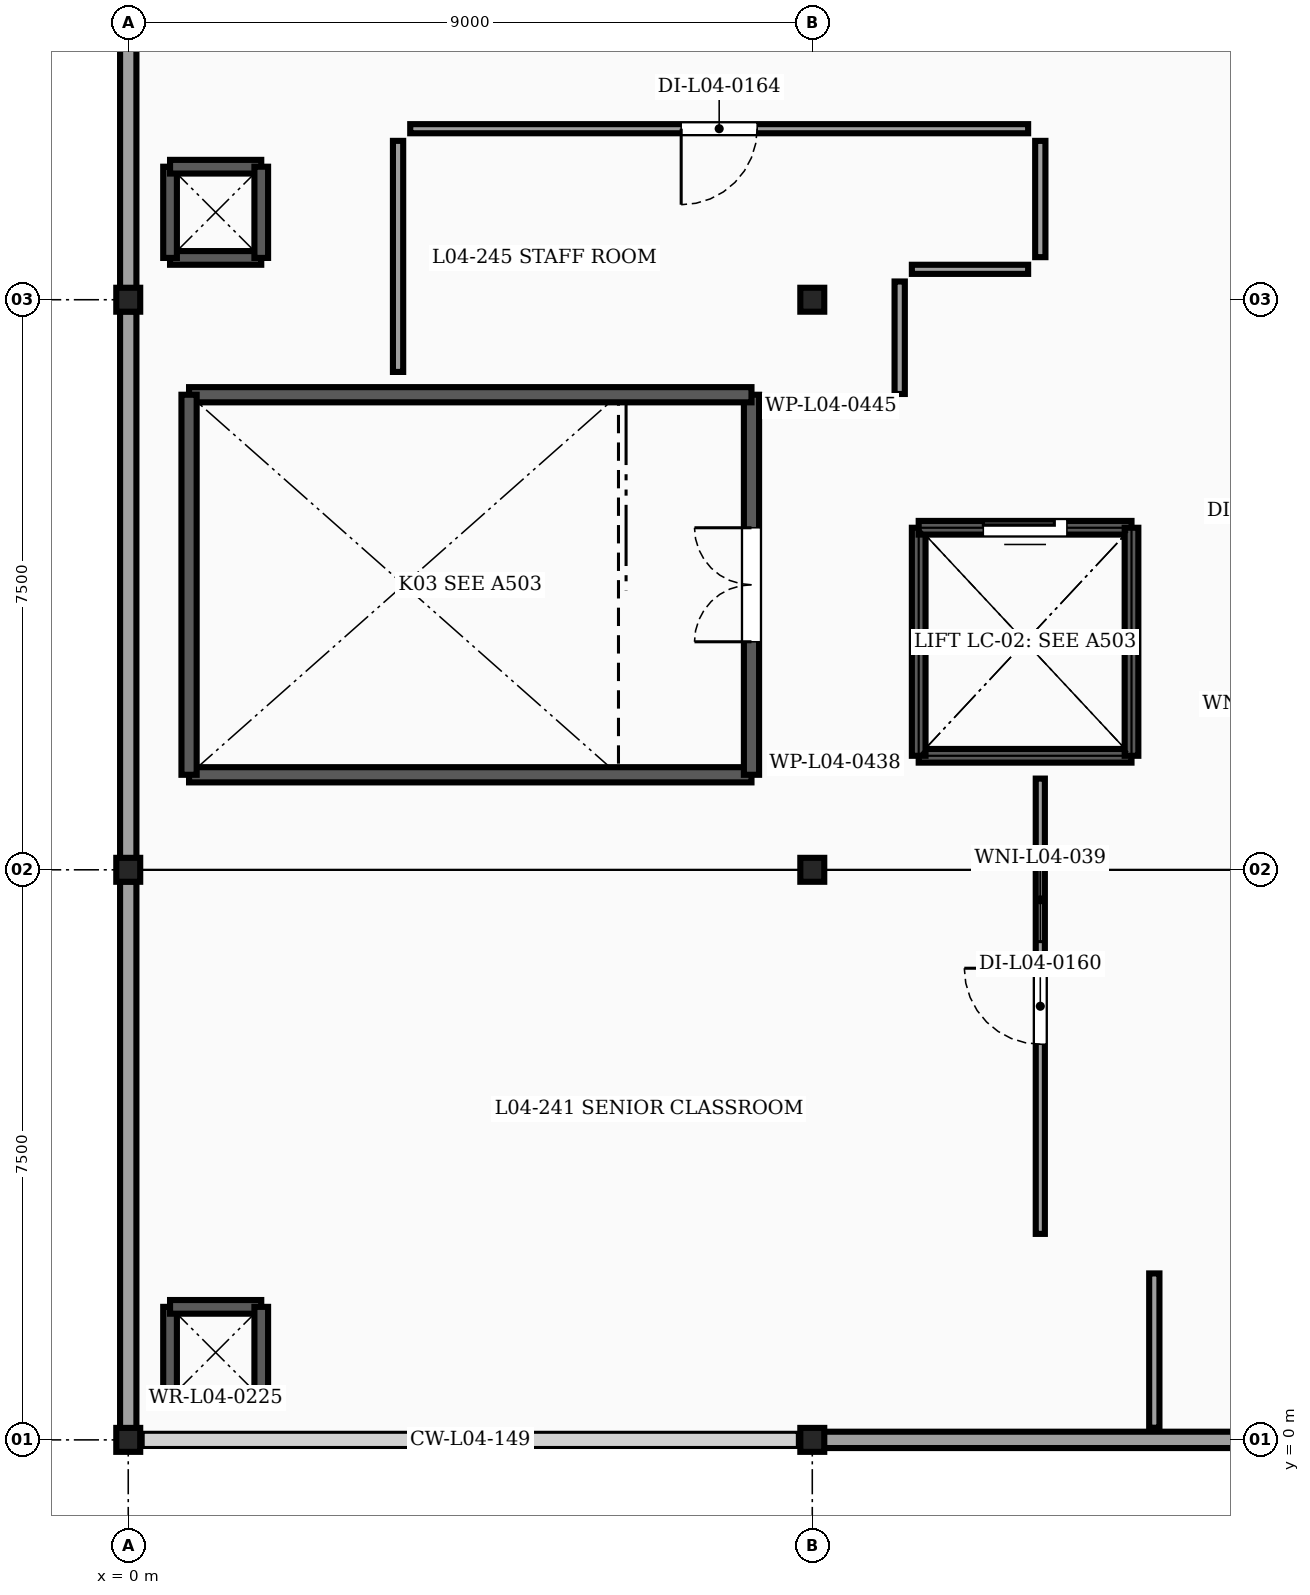
"""IFC4 building model, lengths in metres.
Left out: names, types, materials, properties, quantities, classifications, styles, units other than length and angle.
Written with IfcOpenShell. Run it as: python <this file> out.ifc"""

import sys

from ifc_helpers import new_model, si_unit, direction, frame, frame_2d, origin, origin_2d, place, context, subcontext, project, spatial, rectangle, extrude, element, fill, save


model = new_model("IFC4")
c1 = context("Model", 3, precision=1e-05, world=origin(), true_north=direction((0.0, 1.0)))
c2 = subcontext(c1, "Body", "Model", "MODEL_VIEW")
j1 = project(units=[si_unit("LENGTHUNIT", "METRE"), si_unit("PLANEANGLEUNIT", "RADIAN")], contexts=[c1])
p1 = place(None, origin())
s1 = spatial("IfcSite", under=j1, at=p1, CompositionType="ELEMENT")
p2 = place(p1, origin())
s2 = spatial("IfcBuilding", under=s1, at=p2, CompositionType="ELEMENT")
p3 = place(p2, frame((0.0, 0.0, 16.1)))
s3 = spatial("IfcBuildingStorey", under=s2, at=p3, CompositionType="ELEMENT", Elevation=16.1)
for number, where, z_axis, x_axis in (
    (1, (0.0, 0.0, 0.0), (0.0, 0.0, 1.0), (1.0, 0.0, 0.0)),
    (2, (9.0, 0.0, 0.0), (0.0, 0.0, 1.0), (1.0, 0.0, 0.0)),
    (3, (0.0, 7.5, 0.0), (0.0, 0.0, 1.0), (1.0, 0.0, 0.0)),
    (4, (9.0, 7.5, 0.0), (0.0, 0.0, 1.0), (1.0, 0.0, 0.0)),
    (5, (0.0, 15.0, 0.0), (0.0, 0.0, 1.0), (1.0, 0.0, 0.0)),
    (6, (9.0, 15.0, 0.0), (0.0, 0.0, 1.0), (1.0, 0.0, 0.0)),
):
    element("IfcColumn", number, at=place(p3, frame(where, z_axis=z_axis, x_axis=x_axis)), inside=s3, PredefinedType="COLUMN", context=c2, shape_type="SweptSolid", body=[
        extrude(rectangle(XDim=0.315, YDim=0.315, at=origin_2d()), origin(), (0.0, 0.0, 1.0), 3.65),
    ])
p4 = place(p3, frame((17.846, 0.0, 0.0), z_axis=(0.0, 0.0, 1.0), x_axis=(-1.0, 0.0, 0.0)))
e7 = element("IfcWall", 7, at=p4, inside=s3, PredefinedType="SOLIDWALL", context=c2, shape_type="SweptSolid", body=[
    extrude(rectangle(XDim=8.693, YDim=0.215, at=frame_2d((4.346, 0.0))), origin(), (0.0, 0.0, 1.0), 3.057),
])
for number, where, z_axis, x_axis in (
    (8, (0.0, 0.154, 0.0), (0.0, 0.0, 1.0), (0.0, 1.0, 0.0)),
    (9, (0.0, 7.654, 0.0), (0.0, 0.0, 1.0), (0.0, 1.0, 0.0)),
    (10, (0.0, 15.154, 0.0), (0.0, 0.0, 1.0), (0.0, 1.0, 0.0)),
):
    element("IfcWall", number, at=place(p3, frame(where, z_axis=z_axis, x_axis=x_axis)), inside=s3, PredefinedType="SOLIDWALL", context=c2, shape_type="SweptSolid", body=[
        extrude(rectangle(XDim=7.193, YDim=0.215, at=frame_2d((3.596, 0.0))), origin(), (0.0, 0.0, 1.0), 3.057),
    ])
for number, where, z_axis, x_axis in (
    (11, (1.75, 0.55, 0.0), (0.0, 0.0, 1.0), (-1.0, 0.0, 0.0)),
    (12, (0.55, 0.55, 0.0), (0.0, 0.0, 1.0), (0.0, 1.0, 0.0)),
    (13, (0.55, 1.75, 0.0), (0.0, 0.0, 1.0), (1.0, 0.0, 0.0)),
    (14, (1.75, 1.75, 0.0), (0.0, 0.0, 1.0), (0.0, -1.0, 0.0)),
    (15, (1.75, 15.55, 0.0), (0.0, 0.0, 1.0), (-1.0, 0.0, 0.0)),
    (16, (0.55, 15.55, 0.0), (0.0, 0.0, 1.0), (0.0, 1.0, 0.0)),
    (17, (0.55, 16.75, 0.0), (0.0, 0.0, 1.0), (1.0, 0.0, 0.0)),
    (18, (1.75, 16.75, 0.0), (0.0, 0.0, 1.0), (0.0, -1.0, 0.0)),
):
    element("IfcWall", number, at=place(p3, frame(where, z_axis=z_axis, x_axis=x_axis)), inside=s3, PredefinedType="SHEAR", context=c2, shape_type="SweptSolid", body=[
        extrude(rectangle(XDim=1.2, YDim=0.18, at=frame_2d((0.6, 0.0))), origin(), (0.0, 0.0, 1.0), 3.65),
    ])
p5 = place(p3, frame((0.8, 8.75, 0.0), z_axis=(0.0, 0.0, 1.0), x_axis=(1.0, 0.0, 0.0)))
e19 = element("IfcWall", 19, at=p5, inside=s3, PredefinedType="SHEAR", context=c2, shape_type="SweptSolid", body=[
    extrude(rectangle(XDim=7.4, YDim=0.2, at=frame_2d((3.7, 0.0))), origin(), (0.0, 0.0, 1.0), 3.65),
])
p6 = place(p3, frame((8.2, 8.75, 0.0), z_axis=(0.0, 0.0, 1.0), x_axis=(0.0, 1.0, 0.0)))
e20 = element("IfcWall", 20, at=p6, inside=s3, PredefinedType="SHEAR", context=c2, shape_type="SweptSolid", body=[
    extrude(rectangle(XDim=5.0, YDim=0.2, at=frame_2d((2.5, 0.0))), origin(), (0.0, 0.0, 1.0), 3.65),
])
p7 = place(p6, frame((1.75, 0.0, 0.0)))
e21 = element("IfcOpeningElement", 21, at=p7, cuts=e20, PredefinedType="OPENING", context=c2, shape_type="SweptSolid", body=[
    extrude(rectangle(XDim=1.5, YDim=2.15, at=frame_2d((0.75, 1.075))), frame((0.0, 0.11, 0.0), z_axis=(0.0, -1.0, 0.0), x_axis=(1.0, 0.0, 0.0)), (0.0, 0.0, 1.0), 0.22),
])
p8 = place(p3, frame((8.2, 13.75, 0.0), z_axis=(0.0, 0.0, 1.0), x_axis=(-1.0, 0.0, 0.0)))
e22 = element("IfcWall", 22, at=p8, inside=s3, PredefinedType="SHEAR", context=c2, shape_type="SweptSolid", body=[
    extrude(rectangle(XDim=7.4, YDim=0.2, at=frame_2d((3.7, 0.0))), origin(), (0.0, 0.0, 1.0), 3.65),
])
p9 = place(p3, frame((0.8, 13.75, 0.0), z_axis=(0.0, 0.0, 1.0), x_axis=(0.0, -1.0, 0.0)))
e23 = element("IfcWall", 23, at=p9, inside=s3, PredefinedType="SHEAR", context=c2, shape_type="SweptSolid", body=[
    extrude(rectangle(XDim=5.0, YDim=0.2, at=frame_2d((2.5, 0.0))), origin(), (0.0, 0.0, 1.0), 3.65),
])
p10 = place(p3, frame((13.2, 9.0, 0.0), z_axis=(0.0, 0.0, 1.0), x_axis=(-1.0, 0.0, 0.0)))
e24 = element("IfcWall", 24, at=p10, inside=s3, PredefinedType="SHEAR", context=c2, shape_type="SweptSolid", body=[
    extrude(rectangle(XDim=2.8, YDim=0.18, at=frame_2d((1.4, 0.0))), origin(), (0.0, 0.0, 1.0), 3.65),
])
p11 = place(p3, frame((10.4, 9.0, 0.0), z_axis=(0.0, 0.0, 1.0), x_axis=(0.0, 1.0, 0.0)))
e25 = element("IfcWall", 25, at=p11, inside=s3, PredefinedType="SHEAR", context=c2, shape_type="SweptSolid", body=[
    extrude(rectangle(XDim=3.0, YDim=0.18, at=frame_2d((1.5, 0.0))), origin(), (0.0, 0.0, 1.0), 3.65),
])
p12 = place(p3, frame((10.4, 12.0, 0.0), z_axis=(0.0, 0.0, 1.0), x_axis=(1.0, 0.0, 0.0)))
e26 = element("IfcWall", 26, at=p12, inside=s3, PredefinedType="SHEAR", context=c2, shape_type="SweptSolid", body=[
    extrude(rectangle(XDim=2.8, YDim=0.18, at=frame_2d((1.4, 0.0))), origin(), (0.0, 0.0, 1.0), 3.65),
])
p13 = place(p12, frame((0.85, 0.0, 0.0)))
e27 = element("IfcOpeningElement", 27, at=p13, cuts=e26, PredefinedType="OPENING", context=c2, shape_type="SweptSolid", body=[
    extrude(rectangle(XDim=1.1, YDim=2.15, at=frame_2d((0.55, 1.075))), frame((0.0, 0.1, 0.0), z_axis=(0.0, -1.0, 0.0), x_axis=(1.0, 0.0, 0.0)), (0.0, 0.0, 1.0), 0.2),
])
p14 = place(p3, frame((13.2, 12.0, 0.0), z_axis=(0.0, 0.0, 1.0), x_axis=(0.0, -1.0, 0.0)))
e28 = element("IfcWall", 28, at=p14, inside=s3, PredefinedType="SHEAR", context=c2, shape_type="SweptSolid", body=[
    extrude(rectangle(XDim=3.0, YDim=0.18, at=frame_2d((1.5, 0.0))), origin(), (0.0, 0.0, 1.0), 3.65),
])
p15 = place(p3, frame((12.0, 2.71, 0.0), z_axis=(0.0, 0.0, 1.0), x_axis=(0.0, 1.0, 0.0)))
e29 = element("IfcWall", 29, at=p15, inside=s3, PredefinedType="PARTITIONING", context=c2, shape_type="SweptSolid", body=[
    extrude(rectangle(XDim=5.99, YDim=0.12, at=frame_2d((2.995, 0.0))), origin(), (0.0, 0.0, 1.0), 3.342),
])
p16 = place(p15, frame((2.495, 0.0, 0.0)))
e30 = element("IfcOpeningElement", 30, at=p16, cuts=e29, PredefinedType="OPENING", context=c2, shape_type="SweptSolid", body=[
    extrude(rectangle(XDim=1.0, YDim=2.15, at=frame_2d((0.5, 1.075))), frame((0.0, 0.07, 0.0), z_axis=(0.0, -1.0, 0.0), x_axis=(1.0, 0.0, 0.0)), (0.0, 0.0, 1.0), 0.14),
])
p17 = place(p15, frame((3.845, 0.0, 1.02)))
e31 = element("IfcOpeningElement", 31, at=p17, cuts=e29, PredefinedType="OPENING", context=c2, shape_type="SweptSolid", body=[
    extrude(rectangle(XDim=1.1, YDim=1.12, at=frame_2d((0.55, 0.56))), frame((0.0, 0.07, 0.0), z_axis=(0.0, -1.0, 0.0), x_axis=(1.0, 0.0, 0.0)), (0.0, 0.0, 1.0), 0.14),
])
p18 = place(p3, frame((10.1, 8.9, 0.0), z_axis=(0.0, 0.0, 1.0), x_axis=(-1.0, 0.0, 0.0)))
e32 = element("IfcWall", 32, at=p18, inside=s3, PredefinedType="PARTITIONING", context=c2, shape_type="SweptSolid", body=[
    extrude(rectangle(XDim=1.6, YDim=0.135, at=frame_2d((0.8, 0.0))), origin(), (0.0, 0.0, 1.0), 3.65),
])
p19 = place(p3, frame((8.5, 13.6, 0.0), z_axis=(0.0, 0.0, 1.0), x_axis=(1.0, 0.0, 0.0)))
e33 = element("IfcWall", 33, at=p19, inside=s3, PredefinedType="PARTITIONING", context=c2, shape_type="SweptSolid", body=[
    extrude(rectangle(XDim=1.49, YDim=0.12, at=frame_2d((0.745, 0.0))), origin(), (0.0, 0.0, 1.0), 3.65),
])
p20 = place(p3, frame((10.15, 13.76, 0.0), z_axis=(0.0, 0.0, 1.0), x_axis=(0.0, 1.0, 0.0)))
e34 = element("IfcWall", 34, at=p20, inside=s3, PredefinedType="PARTITIONING", context=c2, shape_type="SweptSolid", body=[
    extrude(rectangle(XDim=1.48, YDim=0.135, at=frame_2d((0.74, 0.0))), origin(), (0.0, 0.0, 1.0), 3.65),
])
p21 = place(p3, frame((10.31, 15.4, 0.0), z_axis=(0.0, 0.0, 1.0), x_axis=(1.0, 0.0, 0.0)))
e35 = element("IfcWall", 35, at=p21, inside=s3, PredefinedType="PARTITIONING", context=c2, shape_type="SweptSolid", body=[
    extrude(rectangle(XDim=1.53, YDim=0.12, at=frame_2d((0.765, 0.0))), origin(), (0.0, 0.0, 1.0), 3.65),
])
p22 = place(p3, frame((12.0, 15.56, 0.0), z_axis=(0.0, 0.0, 1.0), x_axis=(0.0, 1.0, 0.0)))
e36 = element("IfcWall", 36, at=p22, inside=s3, PredefinedType="PARTITIONING", context=c2, shape_type="SweptSolid", body=[
    extrude(rectangle(XDim=1.53, YDim=0.135, at=frame_2d((0.765, 0.0))), origin(), (0.0, 0.0, 1.0), 3.65),
])
p23 = place(p3, frame((11.84, 17.25, 0.0), z_axis=(0.0, 0.0, 1.0), x_axis=(-1.0, 0.0, 0.0)))
e37 = element("IfcWall", 37, at=p23, inside=s3, PredefinedType="PARTITIONING", context=c2, shape_type="SweptSolid", body=[
    extrude(rectangle(XDim=8.13, YDim=0.12, at=frame_2d((4.065, 0.0))), origin(), (0.0, 0.0, 1.0), 3.65),
])
p24 = place(p23, frame((3.565, 0.0, 0.0)))
e38 = element("IfcOpeningElement", 38, at=p24, cuts=e37, PredefinedType="OPENING", context=c2, shape_type="SweptSolid", body=[
    extrude(rectangle(XDim=1.0, YDim=2.15, at=frame_2d((0.5, 1.075))), frame((0.0, 0.07, 0.0), z_axis=(0.0, -1.0, 0.0), x_axis=(1.0, 0.0, 0.0)), (0.0, 0.0, 1.0), 0.14),
])
p25 = place(p3, frame((3.55, 17.09, 0.0), z_axis=(0.0, 0.0, 1.0), x_axis=(0.0, -1.0, 0.0)))
e39 = element("IfcWall", 39, at=p25, inside=s3, PredefinedType="PARTITIONING", context=c2, shape_type="SweptSolid", body=[
    extrude(rectangle(XDim=3.04, YDim=0.135, at=frame_2d((1.52, 0.0))), origin(), (0.0, 0.0, 1.0), 3.65),
])
p26 = place(p3, frame((13.5, 0.16, 0.0), z_axis=(0.0, 0.0, 1.0), x_axis=(0.0, 1.0, 0.0)))
e40 = element("IfcWall", 40, at=p26, inside=s3, PredefinedType="PARTITIONING", context=c2, shape_type="SweptSolid", body=[
    extrude(rectangle(XDim=2.03, YDim=0.135, at=frame_2d((1.015, 0.0))), origin(), (0.0, 0.0, 1.0), 3.65),
])
p27 = place(p7, origin())
e41 = element("IfcDoor", 41, at=p27, inside=s3, OperationType="DOUBLE_DOOR_SINGLE_SWING", PredefinedType="DOOR", context=c2, shape_type="SweptSolid", body=[
    extrude(rectangle(XDim=1.5, YDim=2.15, at=frame_2d((0.75, 1.075))), frame((0.0, 0.025, 0.0), z_axis=(0.0, -1.0, 0.0), x_axis=(1.0, 0.0, 0.0)), (0.0, 0.0, 1.0), 0.05),
])
fill(e21, e41)
p28 = place(p13, origin())
e42 = element("IfcDoor", 42, at=p28, inside=s3, OperationType="SLIDING_TO_LEFT", PredefinedType="DOOR", context=c2, shape_type="SweptSolid", body=[
    extrude(rectangle(XDim=1.1, YDim=2.15, at=frame_2d((0.55, 1.075))), frame((0.0, 0.025, 0.0), z_axis=(0.0, -1.0, 0.0), x_axis=(1.0, 0.0, 0.0)), (0.0, 0.0, 1.0), 0.05),
])
fill(e27, e42)
p29 = place(p16, origin())
e43 = element("IfcDoor", 43, at=p29, inside=s3, OperationType="SINGLE_SWING_RIGHT", PredefinedType="DOOR", context=c2, shape_type="SweptSolid", body=[
    extrude(rectangle(XDim=1.0, YDim=2.15, at=frame_2d((0.5, 1.075))), frame((0.0, 0.025, 0.0), z_axis=(0.0, -1.0, 0.0), x_axis=(1.0, 0.0, 0.0)), (0.0, 0.0, 1.0), 0.05),
])
fill(e30, e43)
p30 = place(p17, origin())
e44 = element("IfcWindow", 44, at=p30, inside=s3, PartitioningType="DOUBLE_PANEL_VERTICAL", PredefinedType="WINDOW", context=c2, shape_type="SweptSolid", body=[
    extrude(rectangle(XDim=1.1, YDim=1.12, at=frame_2d((0.55, 0.56))), frame((0.0, 0.03, 0.0), z_axis=(0.0, -1.0, 0.0), x_axis=(1.0, 0.0, 0.0)), (0.0, 0.0, 1.0), 0.06),
])
fill(e31, e44)
p31 = place(p24, origin())
e45 = element("IfcDoor", 45, at=p31, inside=s3, OperationType="SINGLE_SWING_RIGHT", PredefinedType="DOOR", context=c2, shape_type="SweptSolid", body=[
    extrude(rectangle(XDim=1.0, YDim=2.15, at=frame_2d((0.5, 1.075))), frame((0.0, 0.025, 0.0), z_axis=(0.0, -1.0, 0.0), x_axis=(1.0, 0.0, 0.0)), (0.0, 0.0, 1.0), 0.05),
])
fill(e38, e45)
save(model, sys.argv[1])
